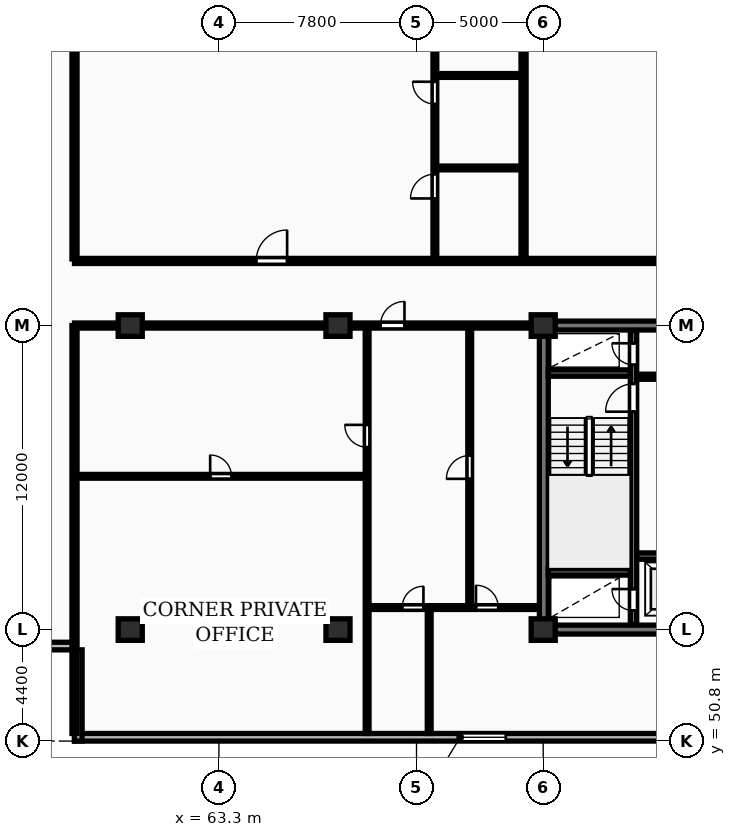
"""IFC4 building model, lengths in metres.
Left out: names, types, materials, properties, quantities, classifications, styles, units other than length and angle.
Written with IfcOpenShell. Run it as: python <this file> out.ifc"""

import sys

from ifc_helpers import new_model, si_unit, direction, frame, frame_2d, origin, origin_2d, place, context, subcontext, project, spatial, rectangle, extrude, element, fill, save


model = new_model("IFC4")
c1 = context("Model", 3, precision=1e-05, world=origin(), true_north=direction((0.0, 1.0)))
c2 = subcontext(c1, "Body", "Model", "MODEL_VIEW")
j1 = project(units=[si_unit("LENGTHUNIT", "METRE"), si_unit("PLANEANGLEUNIT", "RADIAN")], contexts=[c1])
p1 = place(None, origin())
s1 = spatial("IfcSite", under=j1, at=p1, CompositionType="ELEMENT")
p2 = place(p1, origin())
s2 = spatial("IfcBuilding", under=s1, at=p2, CompositionType="ELEMENT")
p3 = place(p2, frame((0.0, 0.0, 106.8)))
s3 = spatial("IfcBuildingStorey", under=s2, at=p3, CompositionType="ELEMENT", Elevation=106.8)
for number, where, z_axis, x_axis in (
    (1, (59.8, 55.2, 0.0), (0.0, 0.0, 1.0), (1.0, 0.0, 0.0)),
    (2, (59.8, 67.2, 0.0), (0.0, 0.0, 1.0), (1.0, 0.0, 0.0)),
    (3, (68.0, 55.2, 0.0), (0.0, 0.0, 1.0), (1.0, 0.0, 0.0)),
    (4, (68.0, 67.2, 0.0), (0.0, 0.0, 1.0), (1.0, 0.0, 0.0)),
    (5, (76.1, 55.2, 0.0), (0.0, 0.0, 1.0), (1.0, 0.0, 0.0)),
    (6, (76.1, 67.2, 0.0), (0.0, 0.0, 1.0), (1.0, 0.0, 0.0)),
):
    element("IfcColumn", number, at=place(p3, frame(where, z_axis=z_axis, x_axis=x_axis)), inside=s3, PredefinedType="COLUMN", context=c2, shape_type="SweptSolid", body=[
        extrude(rectangle(XDim=0.95, YDim=0.85, at=origin_2d()), origin(), (0.0, 0.0, 1.0), 3.25),
    ])
p4 = place(p3, frame((57.6, 50.95, 0.0), z_axis=(0.0, 0.0, 1.0), x_axis=(1.0, 0.0, 0.0)))
e7 = element("IfcWall", 7, at=p4, inside=s3, PredefinedType="STANDARD", context=c2, shape_type="SweptSolid", body=[
    extrude(rectangle(XDim=73.0, YDim=0.3, at=frame_2d((36.5, 0.0))), origin(), (0.0, 0.0, 1.0), 2.97),
])
p5 = place(p4, frame((15.225, 0.0, 0.85)))
e8 = element("IfcOpeningElement", 8, at=p5, cuts=e7, PredefinedType="OPENING", context=c2, shape_type="SweptSolid", body=[
    extrude(rectangle(XDim=1.8, YDim=1.8, at=frame_2d((0.9, 0.9))), frame((0.0, 0.16, 0.0), z_axis=(0.0, -1.0, 0.0), x_axis=(1.0, 0.0, 0.0)), (0.0, 0.0, 1.0), 0.32),
])
p6 = place(p4, frame((58.575, 0.0, 0.85)))
e9 = element("IfcOpeningElement", 9, at=p6, cuts=e7, PredefinedType="OPENING", context=c2, shape_type="SweptSolid", body=[
    extrude(rectangle(XDim=1.8, YDim=1.8, at=frame_2d((0.9, 0.9))), frame((0.0, 0.16, 0.0), z_axis=(0.0, -1.0, 0.0), x_axis=(1.0, 0.0, 0.0)), (0.0, 0.0, 1.0), 0.32),
])
p7 = place(p3, frame((54.0, 54.55, 0.0), z_axis=(0.0, 0.0, 1.0), x_axis=(1.0, 0.0, 0.0)))
e10 = element("IfcWall", 10, at=p7, inside=s3, PredefinedType="STANDARD", context=c2, shape_type="SweptSolid", body=[
    extrude(rectangle(XDim=3.6, YDim=0.3, at=frame_2d((1.8, 0.0))), origin(), (0.0, 0.0, 1.0), 2.97),
])
p8 = place(p3, frame((57.75, 54.4, 0.0), z_axis=(0.0, 0.0, 1.0), x_axis=(0.0, -1.0, 0.0)))
e11 = element("IfcWall", 11, at=p8, inside=s3, PredefinedType="STANDARD", context=c2, shape_type="SweptSolid", body=[
    extrude(rectangle(XDim=3.6, YDim=0.3, at=frame_2d((1.8, 0.0))), origin(), (0.0, 0.0, 1.0), 2.97),
])
p9 = place(p3, frame((75.95, 55.2, 0.0), z_axis=(0.0, 0.0, 1.0), x_axis=(1.0, 0.0, 0.0)))
e12 = element("IfcWall", 12, at=p9, inside=s3, PredefinedType="SHEAR", context=c2, shape_type="SweptSolid", body=[
    extrude(rectangle(XDim=36.3, YDim=0.35, at=frame_2d((18.15, 0.0))), origin(), (0.0, 0.0, 1.0), 3.25),
])
p10 = place(p3, frame((76.125, 55.375, 0.0), z_axis=(0.0, 0.0, 1.0), x_axis=(0.0, 1.0, 0.0)))
e13 = element("IfcWall", 13, at=p10, inside=s3, PredefinedType="SHEAR", context=c2, shape_type="SweptSolid", body=[
    extrude(rectangle(XDim=11.65, YDim=0.35, at=frame_2d((5.825, 0.0))), origin(), (0.0, 0.0, 1.0), 3.25),
])
p11 = place(p3, frame((75.95, 67.2, 0.0), z_axis=(0.0, 0.0, 1.0), x_axis=(1.0, 0.0, 0.0)))
e14 = element("IfcWall", 14, at=p11, inside=s3, PredefinedType="SHEAR", context=c2, shape_type="SweptSolid", body=[
    extrude(rectangle(XDim=36.3, YDim=0.35, at=frame_2d((18.15, 0.0))), origin(), (0.0, 0.0, 1.0), 3.25),
])
p12 = place(p11, frame((5.25, 0.0, 0.0)))
e15 = element("IfcOpeningElement", 15, at=p12, cuts=e14, PredefinedType="OPENING", context=c2, shape_type="SweptSolid", body=[
    extrude(rectangle(XDim=1.0, YDim=2.15, at=frame_2d((0.5, 1.075))), frame((0.0, 0.185, 0.0), z_axis=(0.0, -1.0, 0.0), x_axis=(1.0, 0.0, 0.0)), (0.0, 0.0, 1.0), 0.37),
])
p13 = place(p11, frame((21.6, 0.0, 0.0)))
e16 = element("IfcOpeningElement", 16, at=p13, cuts=e14, PredefinedType="OPENING", context=c2, shape_type="SweptSolid", body=[
    extrude(rectangle(XDim=1.5, YDim=2.2, at=frame_2d((0.75, 1.1))), frame((0.0, 0.185, 0.0), z_axis=(0.0, -1.0, 0.0), x_axis=(1.0, 0.0, 0.0)), (0.0, 0.0, 1.0), 0.37),
])
p14 = place(p11, frame((30.45, 0.0, 0.0)))
e17 = element("IfcOpeningElement", 17, at=p14, cuts=e14, PredefinedType="OPENING", context=c2, shape_type="SweptSolid", body=[
    extrude(rectangle(XDim=1.0, YDim=2.15, at=frame_2d((0.5, 1.075))), frame((0.0, 0.185, 0.0), z_axis=(0.0, -1.0, 0.0), x_axis=(1.0, 0.0, 0.0)), (0.0, 0.0, 1.0), 0.37),
])
p15 = place(p3, frame((79.665, 55.4, 0.0), z_axis=(0.0, 0.0, 1.0), x_axis=(0.0, 1.0, 0.0)))
e18 = element("IfcWall", 18, at=p15, inside=s3, PredefinedType="SHEAR", context=c2, shape_type="SweptSolid", body=[
    extrude(rectangle(XDim=11.6, YDim=0.25, at=frame_2d((5.8, 0.0))), origin(), (0.0, 0.0, 1.0), 3.25),
])
p16 = place(p15, frame((0.55, 0.0, 0.0)))
e19 = element("IfcOpeningElement", 19, at=p16, cuts=e18, PredefinedType="OPENING", context=c2, shape_type="SweptSolid", body=[
    extrude(rectangle(XDim=0.85, YDim=2.05, at=frame_2d((0.425, 1.025))), frame((0.0, 0.135, 0.0), z_axis=(0.0, -1.0, 0.0), x_axis=(1.0, 0.0, 0.0)), (0.0, 0.0, 1.0), 0.27),
])
p17 = place(p15, frame((8.4, 0.0, 0.0)))
e20 = element("IfcOpeningElement", 20, at=p17, cuts=e18, PredefinedType="OPENING", context=c2, shape_type="SweptSolid", body=[
    extrude(rectangle(XDim=1.1, YDim=2.1, at=frame_2d((0.55, 1.05))), frame((0.0, 0.135, 0.0), z_axis=(0.0, -1.0, 0.0), x_axis=(1.0, 0.0, 0.0)), (0.0, 0.0, 1.0), 0.27),
])
p18 = place(p15, frame((10.25, 0.0, 0.0)))
e21 = element("IfcOpeningElement", 21, at=p18, cuts=e18, PredefinedType="OPENING", context=c2, shape_type="SweptSolid", body=[
    extrude(rectangle(XDim=0.85, YDim=2.05, at=frame_2d((0.425, 1.025))), frame((0.0, 0.135, 0.0), z_axis=(0.0, -1.0, 0.0), x_axis=(1.0, 0.0, 0.0)), (0.0, 0.0, 1.0), 0.27),
])
for number, where, z_axis, x_axis in (
    (22, (76.3, 57.475, 0.0), (0.0, 0.0, 1.0), (1.0, 0.0, 0.0)),
    (23, (76.3, 65.325, 0.0), (0.0, 0.0, 1.0), (1.0, 0.0, 0.0)),
):
    element("IfcWall", number, at=place(p3, frame(where, z_axis=z_axis, x_axis=x_axis)), inside=s3, PredefinedType="SHEAR", context=c2, shape_type="SweptSolid", body=[
        extrude(rectangle(XDim=3.24, YDim=0.25, at=frame_2d((1.62, 0.0))), origin(), (0.0, 0.0, 1.0), 3.25),
    ])
p19 = place(p3, frame((79.79, 58.1, 0.0), z_axis=(0.0, 0.0, 1.0), x_axis=(1.0, 0.0, 0.0)))
e24 = element("IfcWall", 24, at=p19, inside=s3, PredefinedType="SHEAR", context=c2, shape_type="SweptSolid", body=[
    extrude(rectangle(XDim=4.39, YDim=0.25, at=frame_2d((2.195, 0.0))), origin(), (0.0, 0.0, 1.0), 3.25),
])
p20 = place(p19, frame((1.05, 0.0, 0.0)))
e25 = element("IfcOpeningElement", 25, at=p20, cuts=e24, PredefinedType="OPENING", context=c2, shape_type="SweptSolid", body=[
    extrude(rectangle(XDim=1.12, YDim=2.12, at=frame_2d((0.56, 1.06))), frame((0.0, 0.135, 0.0), z_axis=(0.0, -1.0, 0.0), x_axis=(1.0, 0.0, 0.0)), (0.0, 0.0, 1.0), 0.27),
])
p21 = place(p19, frame((3.26, 0.0, 0.0)))
e26 = element("IfcOpeningElement", 26, at=p21, cuts=e24, PredefinedType="OPENING", context=c2, shape_type="SweptSolid", body=[
    extrude(rectangle(XDim=0.85, YDim=2.05, at=frame_2d((0.425, 1.025))), frame((0.0, 0.135, 0.0), z_axis=(0.0, -1.0, 0.0), x_axis=(1.0, 0.0, 0.0)), (0.0, 0.0, 1.0), 0.27),
])
p22 = place(p3, frame((79.79, 65.18, 0.0), z_axis=(0.0, 0.0, 1.0), x_axis=(1.0, 0.0, 0.0)))
e27 = element("IfcWall", 27, at=p22, inside=s3, PredefinedType="PARTITIONING", context=c2, shape_type="SweptSolid", body=[
    extrude(rectangle(XDim=4.39, YDim=0.2, at=frame_2d((2.195, 0.0))), origin(), (0.0, 0.0, 1.0), 2.97),
])
p23 = place(p22, frame((1.5, 0.0, 0.0)))
e28 = element("IfcOpeningElement", 28, at=p23, cuts=e27, PredefinedType="OPENING", context=c2, shape_type="SweptSolid", body=[
    extrude(rectangle(XDim=1.1, YDim=2.1, at=frame_2d((0.55, 1.05))), frame((0.0, 0.11, 0.0), z_axis=(0.0, -1.0, 0.0), x_axis=(1.0, 0.0, 0.0)), (0.0, 0.0, 1.0), 0.22),
])
p24 = place(p3, frame((57.6, 51.1, 0.0), z_axis=(0.0, 0.0, 1.0), x_axis=(0.0, 1.0, 0.0)))
e29 = element("IfcWall", 29, at=p24, inside=s3, PredefinedType="PARTITIONING", context=c2, shape_type="SweptSolid", body=[
    extrude(rectangle(XDim=16.1, YDim=0.2, at=frame_2d((8.05, 0.0))), origin(), (0.0, 0.0, 1.0), 2.97),
])
p25 = place(p3, frame((57.6, 61.25, 0.0), z_axis=(0.0, 0.0, 1.0), x_axis=(1.0, 0.0, 0.0)))
e30 = element("IfcWall", 30, at=p25, inside=s3, PredefinedType="PARTITIONING", context=c2, shape_type="SweptSolid", body=[
    extrude(rectangle(XDim=11.55, YDim=0.15, at=frame_2d((5.775, 0.0))), origin(), (0.0, 0.0, 1.0), 2.97),
])
p26 = place(p25, frame((5.355, 0.0, 0.0)))
e31 = element("IfcOpeningElement", 31, at=p26, cuts=e30, PredefinedType="OPENING", context=c2, shape_type="SweptSolid", body=[
    extrude(rectangle(XDim=0.84, YDim=2.04, at=frame_2d((0.42, 1.02))), frame((0.0, 0.085, 0.0), z_axis=(0.0, -1.0, 0.0), x_axis=(1.0, 0.0, 0.0)), (0.0, 0.0, 1.0), 0.17),
])
p27 = place(p3, frame((69.15, 51.1, 0.0), z_axis=(0.0, 0.0, 1.0), x_axis=(0.0, 1.0, 0.0)))
e32 = element("IfcWall", 32, at=p27, inside=s3, PredefinedType="PARTITIONING", context=c2, shape_type="SweptSolid", body=[
    extrude(rectangle(XDim=16.05, YDim=0.15, at=frame_2d((8.025, 0.0))), origin(), (0.0, 0.0, 1.0), 2.97),
])
p28 = place(p27, frame((11.3, 0.0, 0.0)))
e33 = element("IfcOpeningElement", 33, at=p28, cuts=e32, PredefinedType="OPENING", context=c2, shape_type="SweptSolid", body=[
    extrude(rectangle(XDim=0.88, YDim=2.06, at=frame_2d((0.44, 1.03))), frame((0.0, 0.085, 0.0), z_axis=(0.0, -1.0, 0.0), x_axis=(1.0, 0.0, 0.0)), (0.0, 0.0, 1.0), 0.17),
])
p29 = place(p3, frame((73.2, 56.07, 0.0), z_axis=(0.0, 0.0, 1.0), x_axis=(0.0, 1.0, 0.0)))
e34 = element("IfcWall", 34, at=p29, inside=s3, PredefinedType="PARTITIONING", context=c2, shape_type="SweptSolid", body=[
    extrude(rectangle(XDim=11.08, YDim=0.15, at=frame_2d((5.54, 0.0))), origin(), (0.0, 0.0, 1.0), 2.97),
])
p30 = place(p29, frame((5.08, 0.0, 0.0)))
e35 = element("IfcOpeningElement", 35, at=p30, cuts=e34, PredefinedType="OPENING", context=c2, shape_type="SweptSolid", body=[
    extrude(rectangle(XDim=0.92, YDim=2.08, at=frame_2d((0.46, 1.04))), frame((0.0, 0.085, 0.0), z_axis=(0.0, -1.0, 0.0), x_axis=(1.0, 0.0, 0.0)), (0.0, 0.0, 1.0), 0.17),
])
p31 = place(p3, frame((71.6, 51.1, 0.0), z_axis=(0.0, 0.0, 1.0), x_axis=(0.0, 1.0, 0.0)))
e36 = element("IfcWall", 36, at=p31, inside=s3, PredefinedType="PARTITIONING", context=c2, shape_type="SweptSolid", body=[
    extrude(rectangle(XDim=4.97, YDim=0.15, at=frame_2d((2.485, 0.0))), origin(), (0.0, 0.0, 1.0), 2.97),
])
p32 = place(p3, frame((69.17, 56.07, 0.0), z_axis=(0.0, 0.0, 1.0), x_axis=(1.0, 0.0, 0.0)))
e37 = element("IfcWall", 37, at=p32, inside=s3, PredefinedType="PARTITIONING", context=c2, shape_type="SweptSolid", body=[
    extrude(rectangle(XDim=6.76, YDim=0.15, at=frame_2d((3.38, 0.0))), origin(), (0.0, 0.0, 1.0), 2.97),
])
p33 = place(p32, frame((1.362, 0.0, 0.0)))
e38 = element("IfcOpeningElement", 38, at=p33, cuts=e37, PredefinedType="OPENING", context=c2, shape_type="SweptSolid", body=[
    extrude(rectangle(XDim=0.84, YDim=2.04, at=frame_2d((0.42, 1.02))), frame((0.0, 0.085, 0.0), z_axis=(0.0, -1.0, 0.0), x_axis=(1.0, 0.0, 0.0)), (0.0, 0.0, 1.0), 0.17),
])
p34 = place(p32, frame((4.277, 0.0, 0.0)))
e39 = element("IfcOpeningElement", 39, at=p34, cuts=e37, PredefinedType="OPENING", context=c2, shape_type="SweptSolid", body=[
    extrude(rectangle(XDim=0.88, YDim=2.06, at=frame_2d((0.44, 1.03))), frame((0.0, 0.085, 0.0), z_axis=(0.0, -1.0, 0.0), x_axis=(1.0, 0.0, 0.0)), (0.0, 0.0, 1.0), 0.17),
])
p35 = place(p3, frame((57.6, 67.2, 0.0), z_axis=(0.0, 0.0, 1.0), x_axis=(1.0, 0.0, 0.0)))
e40 = element("IfcWall", 40, at=p35, inside=s3, PredefinedType="PARTITIONING", context=c2, shape_type="SweptSolid", body=[
    extrude(rectangle(XDim=18.35, YDim=0.2, at=frame_2d((9.175, 0.0))), origin(), (0.0, 0.0, 1.0), 2.433),
])
p36 = place(p35, frame((12.075, 0.0, 0.0)))
e41 = element("IfcOpeningElement", 41, at=p36, cuts=e40, PredefinedType="OPENING", context=c2, shape_type="SweptSolid", body=[
    extrude(rectangle(XDim=0.95, YDim=2.15, at=frame_2d((0.475, 1.075))), frame((0.0, 0.11, 0.0), z_axis=(0.0, -1.0, 0.0), x_axis=(1.0, 0.0, 0.0)), (0.0, 0.0, 1.0), 0.22),
])
for number, where, z_axis, x_axis in (
    (42, (57.6, 69.83, 0.0), (0.0, 0.0, 1.0), (0.0, 1.0, 0.0)),
    (43, (75.325, 69.83, 0.0), (0.0, 0.0, 1.0), (0.0, 1.0, 0.0)),
):
    element("IfcWall", number, at=place(p3, frame(where, z_axis=z_axis, x_axis=x_axis)), inside=s3, PredefinedType="PARTITIONING", context=c2, shape_type="SweptSolid", body=[
        extrude(rectangle(XDim=26.07, YDim=0.2, at=frame_2d((13.035, 0.0))), origin(), (0.0, 0.0, 1.0), 2.97),
    ])
for number, where, z_axis, x_axis in (
    (44, (71.885, 73.42, 0.0), (0.0, 0.0, 1.0), (1.0, 0.0, 0.0)),
    (45, (71.885, 77.07, 0.0), (0.0, 0.0, 1.0), (1.0, 0.0, 0.0)),
):
    element("IfcWall", number, at=place(p3, frame(where, z_axis=z_axis, x_axis=x_axis)), inside=s3, PredefinedType="PARTITIONING", context=c2, shape_type="SweptSolid", body=[
        extrude(rectangle(XDim=3.36, YDim=0.15, at=frame_2d((1.68, 0.0))), origin(), (0.0, 0.0, 1.0), 2.97),
    ])
p37 = place(p3, frame((71.825, 69.81, 0.0), z_axis=(0.0, 0.0, 1.0), x_axis=(0.0, 1.0, 0.0)))
e46 = element("IfcWall", 46, at=p37, inside=s3, PredefinedType="PARTITIONING", context=c2, shape_type="SweptSolid", body=[
    extrude(rectangle(XDim=20.78, YDim=0.15, at=frame_2d((10.39, 0.0))), origin(), (0.0, 0.0, 1.0), 2.97),
])
p38 = place(p37, frame((2.406, 0.0, 0.0)))
e47 = element("IfcOpeningElement", 47, at=p38, cuts=e46, PredefinedType="OPENING", context=c2, shape_type="SweptSolid", body=[
    extrude(rectangle(XDim=0.96, YDim=2.1, at=frame_2d((0.48, 1.05))), frame((0.0, 0.085, 0.0), z_axis=(0.0, -1.0, 0.0), x_axis=(1.0, 0.0, 0.0)), (0.0, 0.0, 1.0), 0.17),
])
p39 = place(p37, frame((6.133, 0.0, 0.0)))
e48 = element("IfcOpeningElement", 48, at=p39, cuts=e46, PredefinedType="OPENING", context=c2, shape_type="SweptSolid", body=[
    extrude(rectangle(XDim=0.88, YDim=2.06, at=frame_2d((0.44, 1.03))), frame((0.0, 0.085, 0.0), z_axis=(0.0, -1.0, 0.0), x_axis=(1.0, 0.0, 0.0)), (0.0, 0.0, 1.0), 0.17),
])
p40 = place(p37, frame((9.97, 0.0, 0.0)))
e49 = element("IfcOpeningElement", 49, at=p40, cuts=e46, PredefinedType="OPENING", context=c2, shape_type="SweptSolid", body=[
    extrude(rectangle(XDim=0.84, YDim=2.04, at=frame_2d((0.42, 1.02))), frame((0.0, 0.085, 0.0), z_axis=(0.0, -1.0, 0.0), x_axis=(1.0, 0.0, 0.0)), (0.0, 0.0, 1.0), 0.17),
])
p41 = place(p3, frame((57.6, 69.75, 0.0), z_axis=(0.0, 0.0, 1.0), x_axis=(1.0, 0.0, 0.0)))
e50 = element("IfcWall", 50, at=p41, inside=s3, PredefinedType="PARTITIONING", context=c2, shape_type="SweptSolid", body=[
    extrude(rectangle(XDim=73.0, YDim=0.2, at=frame_2d((36.5, 0.0))), origin(), (0.0, 0.0, 1.0), 2.97),
])
p42 = place(p41, frame((7.172, 0.0, 0.0)))
e51 = element("IfcOpeningElement", 51, at=p42, cuts=e50, PredefinedType="OPENING", context=c2, shape_type="SweptSolid", body=[
    extrude(rectangle(XDim=1.22, YDim=2.18, at=frame_2d((0.61, 1.09))), frame((0.0, 0.11, 0.0), z_axis=(0.0, -1.0, 0.0), x_axis=(1.0, 0.0, 0.0)), (0.0, 0.0, 1.0), 0.22),
])
p43 = place(p41, frame((23.96, 0.0, 0.0)))
e52 = element("IfcOpeningElement", 52, at=p43, cuts=e50, PredefinedType="OPENING", context=c2, shape_type="SweptSolid", body=[
    extrude(rectangle(XDim=1.22, YDim=2.18, at=frame_2d((0.61, 1.09))), frame((0.0, 0.11, 0.0), z_axis=(0.0, -1.0, 0.0), x_axis=(1.0, 0.0, 0.0)), (0.0, 0.0, 1.0), 0.22),
])
p44 = place(p41, frame((38.846, 0.0, 0.0)))
e53 = element("IfcOpeningElement", 53, at=p44, cuts=e50, PredefinedType="OPENING", context=c2, shape_type="SweptSolid", body=[
    extrude(rectangle(XDim=0.95, YDim=2.15, at=frame_2d((0.475, 1.075))), frame((0.0, 0.11, 0.0), z_axis=(0.0, -1.0, 0.0), x_axis=(1.0, 0.0, 0.0)), (0.0, 0.0, 1.0), 0.22),
])
p45 = place(p41, frame((50.262, 0.0, 0.0)))
e54 = element("IfcOpeningElement", 54, at=p45, cuts=e50, PredefinedType="OPENING", context=c2, shape_type="SweptSolid", body=[
    extrude(rectangle(XDim=0.95, YDim=2.15, at=frame_2d((0.475, 1.075))), frame((0.0, 0.11, 0.0), z_axis=(0.0, -1.0, 0.0), x_axis=(1.0, 0.0, 0.0)), (0.0, 0.0, 1.0), 0.22),
])
p46 = place(p41, frame((63.754, 0.0, 0.0)))
e55 = element("IfcOpeningElement", 55, at=p46, cuts=e50, PredefinedType="OPENING", context=c2, shape_type="SweptSolid", body=[
    extrude(rectangle(XDim=0.95, YDim=2.15, at=frame_2d((0.475, 1.075))), frame((0.0, 0.11, 0.0), z_axis=(0.0, -1.0, 0.0), x_axis=(1.0, 0.0, 0.0)), (0.0, 0.0, 1.0), 0.22),
])
p47 = place(p5, origin())
e56 = element("IfcWindow", 56, at=p47, inside=s3, PartitioningType="SINGLE_PANEL", PredefinedType="WINDOW", context=c2, shape_type="SweptSolid", body=[
    extrude(rectangle(XDim=1.8, YDim=1.8, at=frame_2d((0.9, 0.9))), frame((0.0, 0.03, 0.0), z_axis=(0.0, -1.0, 0.0), x_axis=(1.0, 0.0, 0.0)), (0.0, 0.0, 1.0), 0.06),
])
fill(e8, e56)
p48 = place(p16, origin())
e57 = element("IfcDoor", 57, at=p48, inside=s3, OperationType="SINGLE_SWING_RIGHT", PredefinedType="DOOR", context=c2, shape_type="SweptSolid", body=[
    extrude(rectangle(XDim=0.85, YDim=2.05, at=frame_2d((0.425, 1.025))), frame((0.0, 0.025, 0.0), z_axis=(0.0, -1.0, 0.0), x_axis=(1.0, 0.0, 0.0)), (0.0, 0.0, 1.0), 0.05),
])
fill(e19, e57)
p49 = place(p17, origin())
e58 = element("IfcDoor", 58, at=p49, inside=s3, OperationType="SINGLE_SWING_LEFT", PredefinedType="DOOR", context=c2, shape_type="SweptSolid", body=[
    extrude(rectangle(XDim=1.1, YDim=2.1, at=frame_2d((0.55, 1.05))), frame((0.0, 0.025, 0.0), z_axis=(0.0, -1.0, 0.0), x_axis=(1.0, 0.0, 0.0)), (0.0, 0.0, 1.0), 0.05),
])
fill(e20, e58)
p50 = place(p18, origin())
e59 = element("IfcDoor", 59, at=p50, inside=s3, OperationType="SINGLE_SWING_RIGHT", PredefinedType="DOOR", context=c2, shape_type="SweptSolid", body=[
    extrude(rectangle(XDim=0.85, YDim=2.05, at=frame_2d((0.425, 1.025))), frame((0.0, 0.025, 0.0), z_axis=(0.0, -1.0, 0.0), x_axis=(1.0, 0.0, 0.0)), (0.0, 0.0, 1.0), 0.05),
])
fill(e21, e59)
p51 = place(p26, origin())
e60 = element("IfcDoor", 60, at=p51, inside=s3, OperationType="SINGLE_SWING_LEFT", PredefinedType="DOOR", context=c2, shape_type="SweptSolid", body=[
    extrude(rectangle(XDim=0.84, YDim=2.04, at=frame_2d((0.42, 1.02))), frame((0.0, 0.025, 0.0), z_axis=(0.0, -1.0, 0.0), x_axis=(1.0, 0.0, 0.0)), (0.0, 0.0, 1.0), 0.05),
])
fill(e31, e60)
p52 = place(p28, origin())
e61 = element("IfcDoor", 61, at=p52, inside=s3, OperationType="SINGLE_SWING_RIGHT", PredefinedType="DOOR", context=c2, shape_type="SweptSolid", body=[
    extrude(rectangle(XDim=0.88, YDim=2.06, at=frame_2d((0.44, 1.03))), frame((0.0, 0.025, 0.0), z_axis=(0.0, -1.0, 0.0), x_axis=(1.0, 0.0, 0.0)), (0.0, 0.0, 1.0), 0.05),
])
fill(e33, e61)
p53 = place(p30, origin())
e62 = element("IfcDoor", 62, at=p53, inside=s3, OperationType="SINGLE_SWING_LEFT", PredefinedType="DOOR", context=c2, shape_type="SweptSolid", body=[
    extrude(rectangle(XDim=0.92, YDim=2.08, at=frame_2d((0.46, 1.04))), frame((0.0, 0.025, 0.0), z_axis=(0.0, -1.0, 0.0), x_axis=(1.0, 0.0, 0.0)), (0.0, 0.0, 1.0), 0.05),
])
fill(e35, e62)
p54 = place(p33, origin())
e63 = element("IfcDoor", 63, at=p54, inside=s3, OperationType="SINGLE_SWING_RIGHT", PredefinedType="DOOR", context=c2, shape_type="SweptSolid", body=[
    extrude(rectangle(XDim=0.84, YDim=2.04, at=frame_2d((0.42, 1.02))), frame((0.0, 0.025, 0.0), z_axis=(0.0, -1.0, 0.0), x_axis=(1.0, 0.0, 0.0)), (0.0, 0.0, 1.0), 0.05),
])
fill(e38, e63)
p55 = place(p34, origin())
e64 = element("IfcDoor", 64, at=p55, inside=s3, OperationType="SINGLE_SWING_LEFT", PredefinedType="DOOR", context=c2, shape_type="SweptSolid", body=[
    extrude(rectangle(XDim=0.88, YDim=2.06, at=frame_2d((0.44, 1.03))), frame((0.0, 0.025, 0.0), z_axis=(0.0, -1.0, 0.0), x_axis=(1.0, 0.0, 0.0)), (0.0, 0.0, 1.0), 0.05),
])
fill(e39, e64)
p56 = place(p36, origin())
e65 = element("IfcDoor", 65, at=p56, inside=s3, OperationType="SINGLE_SWING_RIGHT", PredefinedType="DOOR", context=c2, shape_type="SweptSolid", body=[
    extrude(rectangle(XDim=0.95, YDim=2.15, at=frame_2d((0.475, 1.075))), frame((0.0, 0.025, 0.0), z_axis=(0.0, -1.0, 0.0), x_axis=(1.0, 0.0, 0.0)), (0.0, 0.0, 1.0), 0.05),
])
fill(e41, e65)
p57 = place(p38, origin())
e66 = element("IfcDoor", 66, at=p57, inside=s3, OperationType="SINGLE_SWING_LEFT", PredefinedType="DOOR", context=c2, shape_type="SweptSolid", body=[
    extrude(rectangle(XDim=0.96, YDim=2.1, at=frame_2d((0.48, 1.05))), frame((0.0, 0.025, 0.0), z_axis=(0.0, -1.0, 0.0), x_axis=(1.0, 0.0, 0.0)), (0.0, 0.0, 1.0), 0.05),
])
fill(e47, e66)
p58 = place(p39, origin())
e67 = element("IfcDoor", 67, at=p58, inside=s3, OperationType="SINGLE_SWING_RIGHT", PredefinedType="DOOR", context=c2, shape_type="SweptSolid", body=[
    extrude(rectangle(XDim=0.88, YDim=2.06, at=frame_2d((0.44, 1.03))), frame((0.0, 0.025, 0.0), z_axis=(0.0, -1.0, 0.0), x_axis=(1.0, 0.0, 0.0)), (0.0, 0.0, 1.0), 0.05),
])
fill(e48, e67)
p59 = place(p42, origin())
e68 = element("IfcDoor", 68, at=p59, inside=s3, OperationType="SINGLE_SWING_RIGHT", PredefinedType="DOOR", context=c2, shape_type="SweptSolid", body=[
    extrude(rectangle(XDim=1.22, YDim=2.18, at=frame_2d((0.61, 1.09))), frame((0.0, 0.025, 0.0), z_axis=(0.0, -1.0, 0.0), x_axis=(1.0, 0.0, 0.0)), (0.0, 0.0, 1.0), 0.05),
])
fill(e51, e68)
save(model, sys.argv[1])
